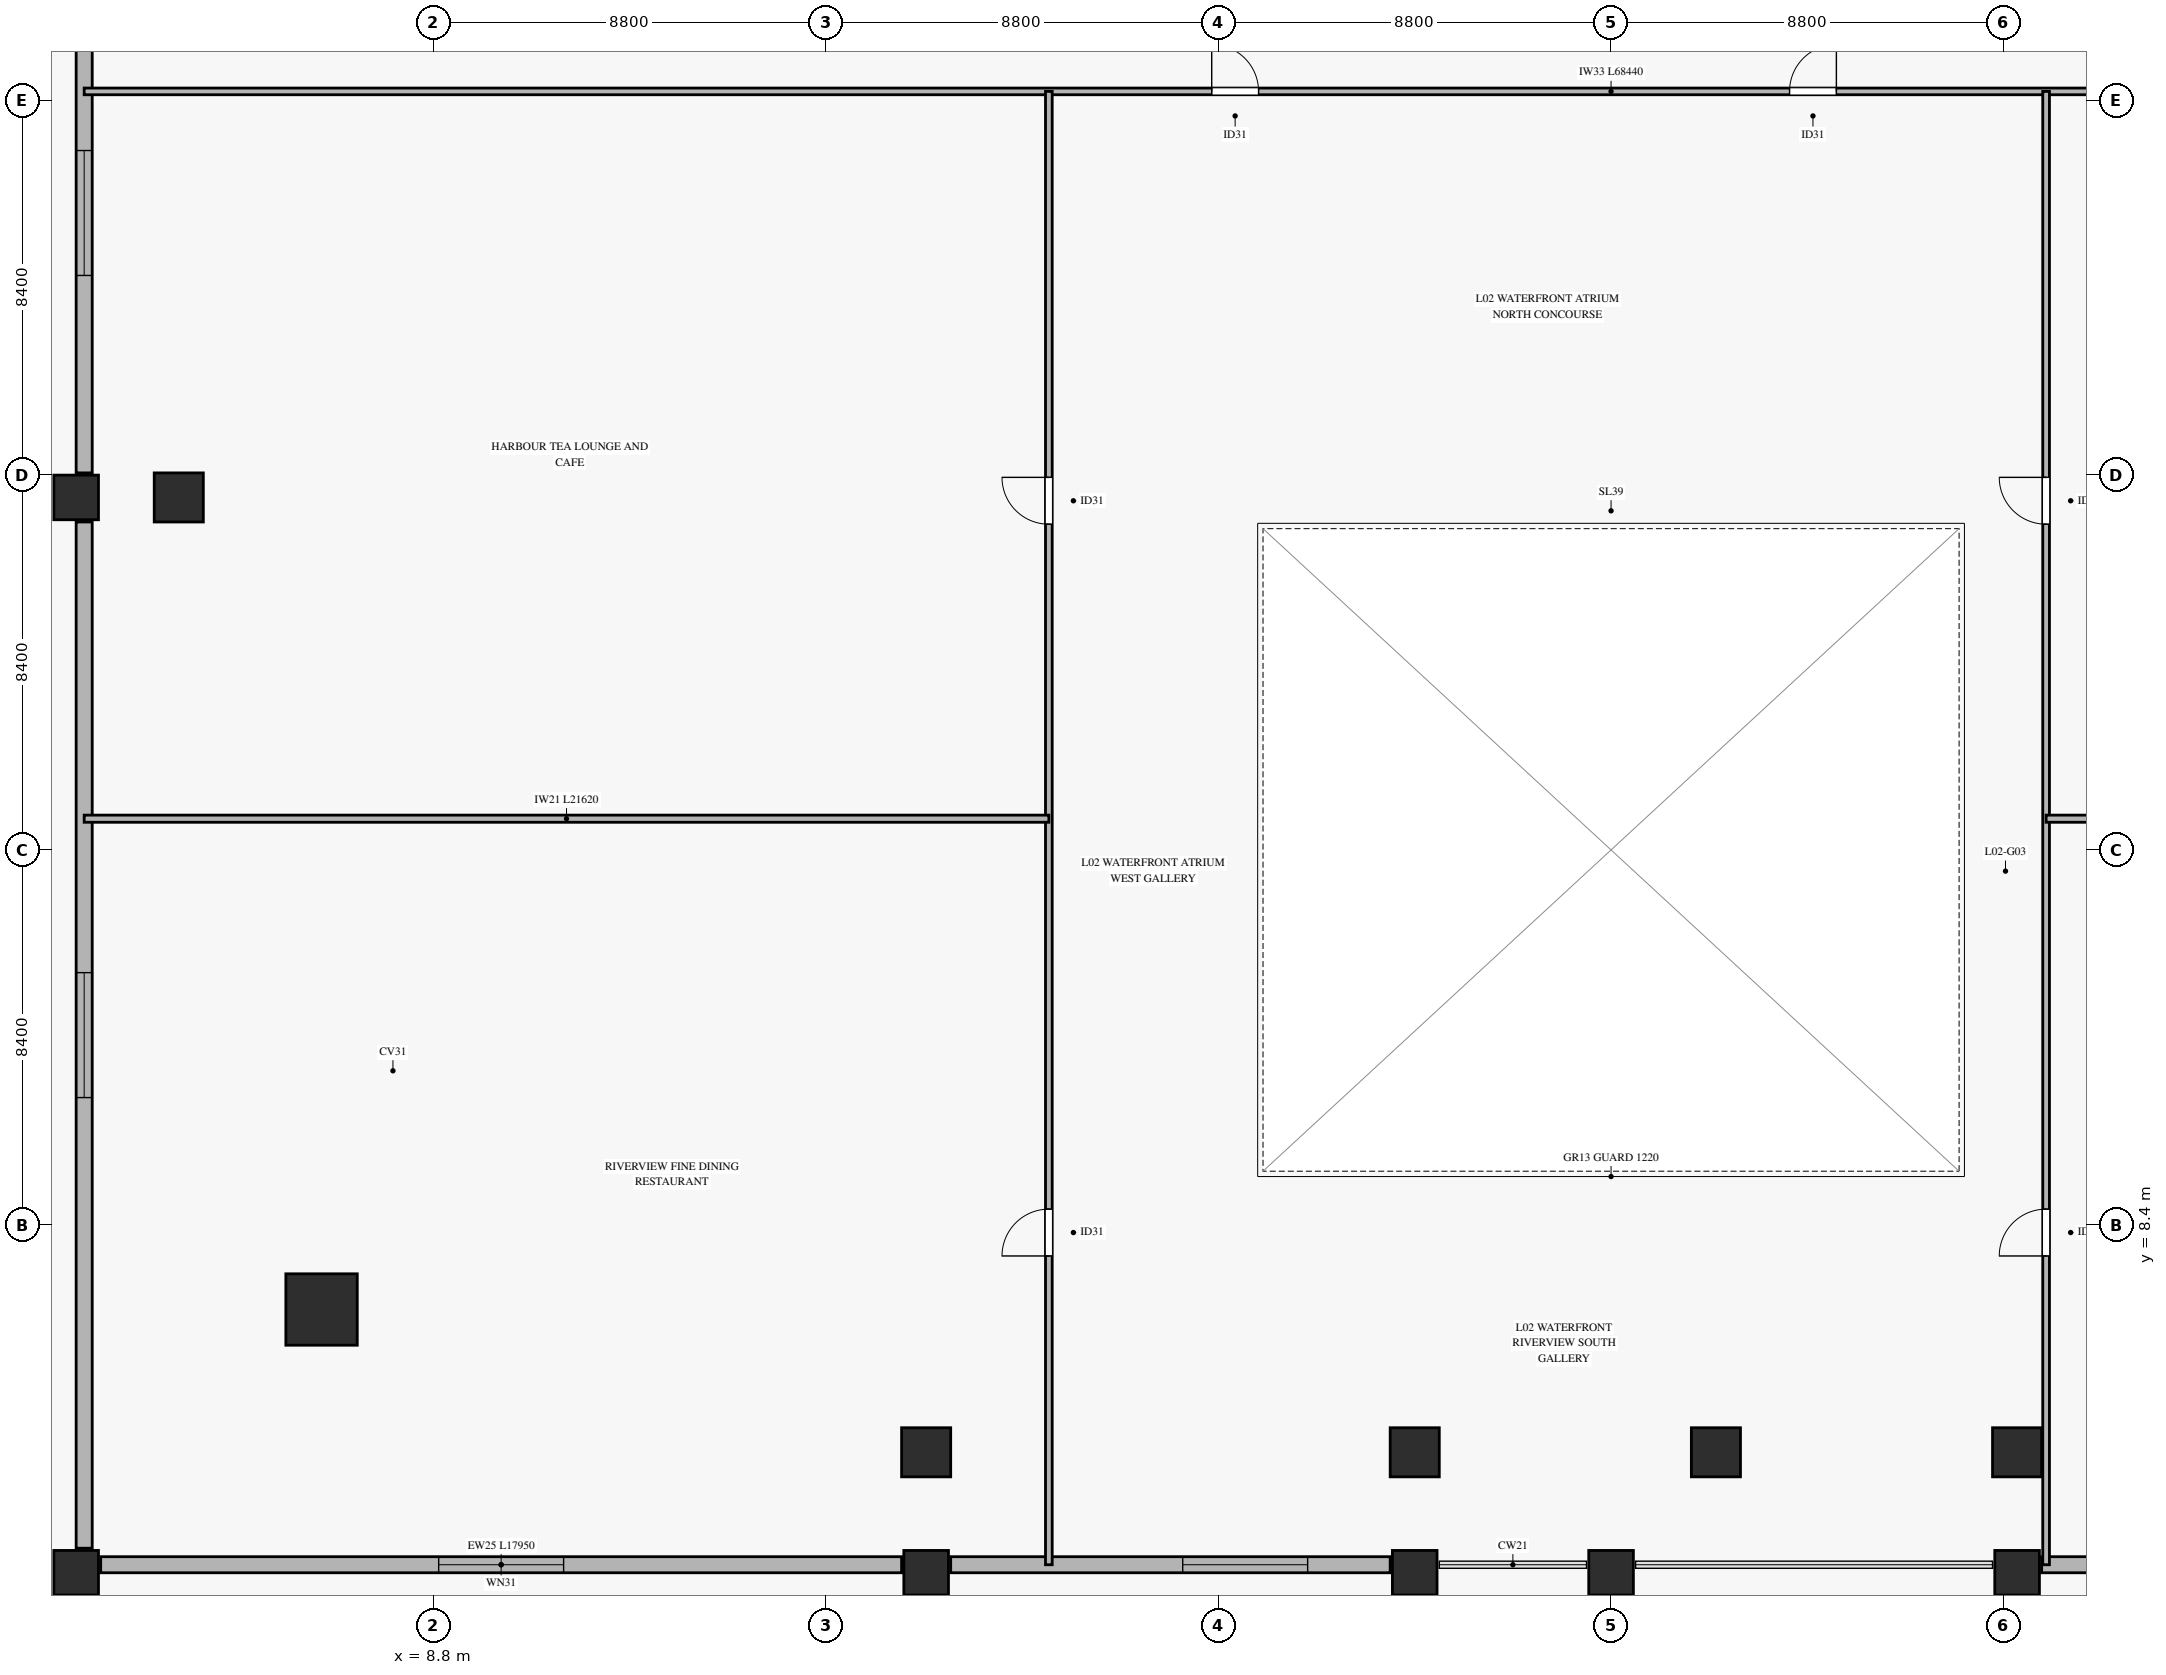
"""IFC4 building model, lengths in metres.
Left out: names, types, materials, properties, quantities, classifications, styles, units other than length and angle.
Written with IfcOpenShell. Run it as: python <this file> out.ifc"""

import sys

from ifc_helpers import new_model, si_unit, direction, frame, frame_2d, origin, origin_2d, place, context, subcontext, project, spatial, rectangle, hollow_rectangle, extrude, source, transform, mapped, element, fill, save


model = new_model("IFC4")
c1 = context("Model", 3, precision=1e-05, world=origin(), true_north=direction((0.0, 1.0)))
c2 = subcontext(c1, "Body", "Model", "MODEL_VIEW")
j1 = project(units=[si_unit("LENGTHUNIT", "METRE"), si_unit("PLANEANGLEUNIT", "RADIAN")], contexts=[c1])
p1 = place(None, origin())
s1 = spatial("IfcSite", under=j1, at=p1, CompositionType="ELEMENT")
p2 = place(p1, origin())
s2 = spatial("IfcBuilding", under=s1, at=p2, CompositionType="ELEMENT")
p3 = place(p2, frame((0.0, 0.0, 5.6)))
s3 = spatial("IfcBuildingStorey", under=s2, at=p3, CompositionType="ELEMENT", Elevation=5.6)
m1 = source(origin(), c2, "Body", "SweptSolid", [
    extrude(hollow_rectangle(XDim=1.6, YDim=1.6, WallThickness=0.075, at=origin_2d()), origin(), (0.0, 0.0, 1.0), 4.54),
])
p4 = place(p3, frame((6.3, 6.5, 0.0), z_axis=(0.0, 0.0, 1.0), x_axis=(1.0, 0.0, 0.0)))
e1 = element("IfcColumn", 1, at=p4, inside=s3, PredefinedType="COLUMN", context=c2, shape_type="MappedRepresentation", body=[
    mapped(m1, transform((0.0, 0.0, 0.0), x_axis=(1.0, 0.0, 0.0), y_axis=(0.0, 1.0, 0.0), z_axis=(0.0, 0.0, 1.0), scale=1.0)),
])
m2 = source(origin(), c2, "Body", "SweptSolid", [
    extrude(hollow_rectangle(XDim=1.1, YDim=1.1, WallThickness=0.05, at=origin_2d()), origin(), (0.0, 0.0, 1.0), 4.54),
])
for number, where, z_axis, x_axis in (
    (2, (19.85, 3.3, 0.0), (0.0, 0.0, 1.0), (1.0, 0.0, 0.0)),
    (3, (30.8, 3.3, 0.0), (0.0, 0.0, 1.0), (1.0, 0.0, 0.0)),
    (4, (37.55, 3.3, 0.0), (0.0, 0.0, 1.0), (1.0, 0.0, 0.0)),
    (5, (44.3, 3.3, 0.0), (0.0, 0.0, 1.0), (1.0, 0.0, 0.0)),
    (6, (3.1, 24.7, 0.0), (0.0, 0.0, 1.0), (1.0, 0.0, 0.0)),
):
    element("IfcColumn", number, at=place(p3, frame(where, z_axis=z_axis, x_axis=x_axis)), inside=s3, PredefinedType="COLUMN", context=c2, shape_type="MappedRepresentation", body=[
        mapped(m2, transform((0.0, 0.0, 0.0), x_axis=(1.0, 0.0, 0.0), y_axis=(0.0, 1.0, 0.0), z_axis=(0.0, 0.0, 1.0), scale=1.0)),
    ])
m3 = source(origin(), c2, "Body", "SweptSolid", [
    extrude(hollow_rectangle(XDim=1.0, YDim=1.0, WallThickness=0.045, at=origin_2d()), origin(), (0.0, 0.0, 1.0), 4.54),
])
for number, where, z_axis, x_axis in (
    (7, (0.8, 0.6, 0.0), (0.0, 0.0, 1.0), (1.0, 0.0, 0.0)),
    (8, (19.85, 0.6, 0.0), (0.0, 0.0, 1.0), (1.0, 0.0, 0.0)),
    (9, (30.8, 0.6, 0.0), (0.0, 0.0, 1.0), (1.0, 0.0, 0.0)),
    (10, (35.2, 0.6, 0.0), (0.0, 0.0, 1.0), (1.0, 0.0, 0.0)),
    (11, (44.3, 0.6, 0.0), (0.0, 0.0, 1.0), (1.0, 0.0, 0.0)),
    (12, (0.8, 24.7, 0.0), (0.0, 0.0, 1.0), (1.0, 0.0, 0.0)),
):
    element("IfcColumn", number, at=place(p3, frame(where, z_axis=z_axis, x_axis=x_axis)), inside=s3, PredefinedType="COLUMN", context=c2, shape_type="MappedRepresentation", body=[
        mapped(m3, transform((0.0, 0.0, 0.0), x_axis=(1.0, 0.0, 0.0), y_axis=(0.0, 1.0, 0.0), z_axis=(0.0, 0.0, 1.0), scale=1.0)),
    ])
p5 = place(p3, frame((1.35, 0.78, 0.0), z_axis=(0.0, 0.0, 1.0), x_axis=(1.0, 0.0, 0.0)))
e13 = element("IfcWall", 13, at=p5, inside=s3, PredefinedType="SOLIDWALL", context=c2, shape_type="SweptSolid", body=[
    extrude(rectangle(XDim=17.95, YDim=0.36, at=frame_2d((8.975, 0.0))), origin(), (0.0, 0.0, 1.0), 3.42),
])
p6 = place(p5, frame((7.575, 0.0, 0.72)))
e14 = element("IfcOpeningElement", 14, at=p6, cuts=e13, PredefinedType="OPENING", context=c2, shape_type="SweptSolid", body=[
    extrude(rectangle(XDim=2.8, YDim=2.0, at=frame_2d((1.4, 1.0))), frame((0.0, 0.19, 0.0), z_axis=(0.0, -1.0, 0.0), x_axis=(1.0, 0.0, 0.0)), (0.0, 0.0, 1.0), 0.38),
])
p7 = place(p3, frame((20.4, 0.78, 0.0), z_axis=(0.0, 0.0, 1.0), x_axis=(1.0, 0.0, 0.0)))
e15 = element("IfcWall", 15, at=p7, inside=s3, PredefinedType="SOLIDWALL", context=c2, shape_type="SweptSolid", body=[
    extrude(rectangle(XDim=9.85, YDim=0.36, at=frame_2d((4.925, 0.0))), origin(), (0.0, 0.0, 1.0), 3.42),
])
p8 = place(p7, frame((5.2, 0.0, 0.72)))
e16 = element("IfcOpeningElement", 16, at=p8, cuts=e15, PredefinedType="OPENING", context=c2, shape_type="SweptSolid", body=[
    extrude(rectangle(XDim=2.8, YDim=2.0, at=frame_2d((1.4, 1.0))), frame((0.0, 0.19, 0.0), z_axis=(0.0, -1.0, 0.0), x_axis=(1.0, 0.0, 0.0)), (0.0, 0.0, 1.0), 0.38),
])
p9 = place(p3, frame((44.85, 0.78, 0.0), z_axis=(0.0, 0.0, 1.0), x_axis=(1.0, 0.0, 0.0)))
e17 = element("IfcWall", 17, at=p9, inside=s3, PredefinedType="SOLIDWALL", context=c2, shape_type="SweptSolid", body=[
    extrude(rectangle(XDim=5.15, YDim=0.36, at=frame_2d((2.575, 0.0))), origin(), (0.0, 0.0, 1.0), 3.42),
])
p10 = place(p9, frame((1.5, 0.0, 0.72)))
e18 = element("IfcOpeningElement", 18, at=p10, cuts=e17, PredefinedType="OPENING", context=c2, shape_type="SweptSolid", body=[
    extrude(rectangle(XDim=2.8, YDim=2.0, at=frame_2d((1.4, 1.0))), frame((0.0, 0.19, 0.0), z_axis=(0.0, -1.0, 0.0), x_axis=(1.0, 0.0, 0.0)), (0.0, 0.0, 1.0), 0.38),
])
p11 = place(p3, frame((0.98, 1.15, 0.0), z_axis=(0.0, 0.0, 1.0), x_axis=(0.0, 1.0, 0.0)))
e19 = element("IfcWall", 19, at=p11, inside=s3, PredefinedType="SOLIDWALL", context=c2, shape_type="SweptSolid", body=[
    extrude(rectangle(XDim=23.0, YDim=0.36, at=frame_2d((11.5, 0.0))), origin(), (0.0, 0.0, 1.0), 3.42),
])
p12 = place(p11, frame((10.1, 0.0, 0.72)))
e20 = element("IfcOpeningElement", 20, at=p12, cuts=e19, PredefinedType="OPENING", context=c2, shape_type="SweptSolid", body=[
    extrude(rectangle(XDim=2.8, YDim=2.0, at=frame_2d((1.4, 1.0))), frame((0.0, 0.19, 0.0), z_axis=(0.0, -1.0, 0.0), x_axis=(1.0, 0.0, 0.0)), (0.0, 0.0, 1.0), 0.38),
])
p13 = place(p3, frame((0.98, 25.25, 0.0), z_axis=(0.0, 0.0, 1.0), x_axis=(0.0, 1.0, 0.0)))
e21 = element("IfcWall", 21, at=p13, inside=s3, PredefinedType="SOLIDWALL", context=c2, shape_type="SweptSolid", body=[
    extrude(rectangle(XDim=11.65, YDim=0.36, at=frame_2d((5.825, 0.0))), origin(), (0.0, 0.0, 1.0), 3.42),
])
p14 = place(p13, frame((4.425, 0.0, 0.72)))
e22 = element("IfcOpeningElement", 22, at=p14, cuts=e21, PredefinedType="OPENING", context=c2, shape_type="SweptSolid", body=[
    extrude(rectangle(XDim=2.8, YDim=2.0, at=frame_2d((1.4, 1.0))), frame((0.0, 0.19, 0.0), z_axis=(0.0, -1.0, 0.0), x_axis=(1.0, 0.0, 0.0)), (0.0, 0.0, 1.0), 0.38),
])
p15 = place(p3, frame((0.98, 33.8, 0.0), z_axis=(0.0, 0.0, 1.0), x_axis=(1.0, 0.0, 0.0)))
e23 = element("IfcWall", 23, at=p15, inside=s3, PredefinedType="PARTITIONING", context=c2, shape_type="SweptSolid", body=[
    extrude(rectangle(XDim=68.44, YDim=0.15, at=frame_2d((34.22, 0.0))), origin(), (0.0, 0.0, 1.0), 3.425),
])
p16 = place(p15, frame((25.27, 0.0, 0.0)))
e24 = element("IfcOpeningElement", 24, at=p16, cuts=e23, PredefinedType="OPENING", context=c2, shape_type="SweptSolid", body=[
    extrude(rectangle(XDim=1.05, YDim=2.15, at=frame_2d((0.525, 1.075))), frame((0.0, 0.085, 0.0), z_axis=(0.0, -1.0, 0.0), x_axis=(1.0, 0.0, 0.0)), (0.0, 0.0, 1.0), 0.17),
])
p17 = place(p15, frame((38.22, 0.0, 0.0)))
e25 = element("IfcOpeningElement", 25, at=p17, cuts=e23, PredefinedType="OPENING", context=c2, shape_type="SweptSolid", body=[
    extrude(rectangle(XDim=1.05, YDim=2.15, at=frame_2d((0.525, 1.075))), frame((0.0, 0.085, 0.0), z_axis=(0.0, -1.0, 0.0), x_axis=(1.0, 0.0, 0.0)), (0.0, 0.0, 1.0), 0.17),
])
p18 = place(p3, frame((22.6, 0.78, 0.0), z_axis=(0.0, 0.0, 1.0), x_axis=(0.0, 1.0, 0.0)))
e26 = element("IfcWall", 26, at=p18, inside=s3, PredefinedType="PARTITIONING", context=c2, shape_type="SweptSolid", body=[
    extrude(rectangle(XDim=33.02, YDim=0.15, at=frame_2d((16.51, 0.0))), origin(), (0.0, 0.0, 1.0), 3.425),
])
p19 = place(p18, frame((6.92, 0.0, 0.0)))
e27 = element("IfcOpeningElement", 27, at=p19, cuts=e26, PredefinedType="OPENING", context=c2, shape_type="SweptSolid", body=[
    extrude(rectangle(XDim=1.05, YDim=2.15, at=frame_2d((0.525, 1.075))), frame((0.0, 0.085, 0.0), z_axis=(0.0, -1.0, 0.0), x_axis=(1.0, 0.0, 0.0)), (0.0, 0.0, 1.0), 0.17),
])
p20 = place(p18, frame((23.32, 0.0, 0.0)))
e28 = element("IfcOpeningElement", 28, at=p20, cuts=e26, PredefinedType="OPENING", context=c2, shape_type="SweptSolid", body=[
    extrude(rectangle(XDim=1.05, YDim=2.15, at=frame_2d((0.525, 1.075))), frame((0.0, 0.085, 0.0), z_axis=(0.0, -1.0, 0.0), x_axis=(1.0, 0.0, 0.0)), (0.0, 0.0, 1.0), 0.17),
])
p21 = place(p3, frame((44.95, 0.78, 0.0), z_axis=(0.0, 0.0, 1.0), x_axis=(0.0, 1.0, 0.0)))
e29 = element("IfcWall", 29, at=p21, inside=s3, PredefinedType="PARTITIONING", context=c2, shape_type="SweptSolid", body=[
    extrude(rectangle(XDim=33.02, YDim=0.15, at=frame_2d((16.51, 0.0))), origin(), (0.0, 0.0, 1.0), 3.425),
])
p22 = place(p21, frame((6.92, 0.0, 0.0)))
e30 = element("IfcOpeningElement", 30, at=p22, cuts=e29, PredefinedType="OPENING", context=c2, shape_type="SweptSolid", body=[
    extrude(rectangle(XDim=1.05, YDim=2.15, at=frame_2d((0.525, 1.075))), frame((0.0, 0.085, 0.0), z_axis=(0.0, -1.0, 0.0), x_axis=(1.0, 0.0, 0.0)), (0.0, 0.0, 1.0), 0.17),
])
p23 = place(p21, frame((23.32, 0.0, 0.0)))
e31 = element("IfcOpeningElement", 31, at=p23, cuts=e29, PredefinedType="OPENING", context=c2, shape_type="SweptSolid", body=[
    extrude(rectangle(XDim=1.05, YDim=2.15, at=frame_2d((0.525, 1.075))), frame((0.0, 0.085, 0.0), z_axis=(0.0, -1.0, 0.0), x_axis=(1.0, 0.0, 0.0)), (0.0, 0.0, 1.0), 0.17),
])
p24 = place(p3, frame((0.98, 17.5, 0.0), z_axis=(0.0, 0.0, 1.0), x_axis=(1.0, 0.0, 0.0)))
e32 = element("IfcWall", 32, at=p24, inside=s3, PredefinedType="PARTITIONING", context=c2, shape_type="SweptSolid", body=[
    extrude(rectangle(XDim=21.62, YDim=0.16, at=frame_2d((10.81, 0.0))), origin(), (0.0, 0.0, 1.0), 3.425),
])
p25 = place(p3, frame((44.95, 17.5, 0.0), z_axis=(0.0, 0.0, 1.0), x_axis=(1.0, 0.0, 0.0)))
e33 = element("IfcWall", 33, at=p25, inside=s3, PredefinedType="PARTITIONING", context=c2, shape_type="SweptSolid", body=[
    extrude(rectangle(XDim=24.47, YDim=0.16, at=frame_2d((12.235, 0.0))), origin(), (0.0, 0.0, 1.0), 3.425),
])
m4 = source(origin(), c2, "Body", "SweptSolid", [
    extrude(rectangle(XDim=2.8, YDim=2.0, at=frame_2d((1.4, 1.0))), frame((0.0, 0.03, 0.0), z_axis=(0.0, -1.0, 0.0), x_axis=(1.0, 0.0, 0.0)), (0.0, 0.0, 1.0), 0.06),
])
p26 = place(p6, origin())
e34 = element("IfcWindow", 34, at=p26, inside=s3, PartitioningType="SINGLE_PANEL", PredefinedType="WINDOW", context=c2, shape_type="MappedRepresentation", body=[
    mapped(m4, transform((0.0, 0.0, 0.0), x_axis=(1.0, 0.0, 0.0), y_axis=(0.0, 1.0, 0.0), z_axis=(0.0, 0.0, 1.0), scale=1.0)),
])
fill(e14, e34)
p27 = place(p8, origin())
e35 = element("IfcWindow", 35, at=p27, inside=s3, PartitioningType="SINGLE_PANEL", PredefinedType="WINDOW", context=c2, shape_type="MappedRepresentation", body=[
    mapped(m4, transform((0.0, 0.0, 0.0), x_axis=(1.0, 0.0, 0.0), y_axis=(0.0, 1.0, 0.0), z_axis=(0.0, 0.0, 1.0), scale=1.0)),
])
fill(e16, e35)
p28 = place(p12, origin())
e36 = element("IfcWindow", 36, at=p28, inside=s3, PartitioningType="SINGLE_PANEL", PredefinedType="WINDOW", context=c2, shape_type="MappedRepresentation", body=[
    mapped(m4, transform((0.0, 0.0, 0.0), x_axis=(1.0, 0.0, 0.0), y_axis=(0.0, 1.0, 0.0), z_axis=(0.0, 0.0, 1.0), scale=1.0)),
])
fill(e20, e36)
p29 = place(p14, origin())
e37 = element("IfcWindow", 37, at=p29, inside=s3, PartitioningType="SINGLE_PANEL", PredefinedType="WINDOW", context=c2, shape_type="MappedRepresentation", body=[
    mapped(m4, transform((0.0, 0.0, 0.0), x_axis=(1.0, 0.0, 0.0), y_axis=(0.0, 1.0, 0.0), z_axis=(0.0, 0.0, 1.0), scale=1.0)),
])
fill(e22, e37)
m5 = source(origin(), c2, "Body", "SweptSolid", [
    extrude(rectangle(XDim=1.05, YDim=2.15, at=frame_2d((0.525, 1.075))), frame((0.0, 0.025, 0.0), z_axis=(0.0, -1.0, 0.0), x_axis=(1.0, 0.0, 0.0)), (0.0, 0.0, 1.0), 0.05),
])
p30 = place(p16, origin())
e38 = element("IfcDoor", 38, at=p30, inside=s3, OperationType="SINGLE_SWING_LEFT", PredefinedType="DOOR", context=c2, shape_type="MappedRepresentation", body=[
    mapped(m5, transform((0.0, 0.0, 0.0), x_axis=(1.0, 0.0, 0.0), y_axis=(0.0, 1.0, 0.0), z_axis=(0.0, 0.0, 1.0), scale=1.0)),
])
fill(e24, e38)
p31 = place(p17, origin())
e39 = element("IfcDoor", 39, at=p31, inside=s3, OperationType="SINGLE_SWING_RIGHT", PredefinedType="DOOR", context=c2, shape_type="MappedRepresentation", body=[
    mapped(m5, transform((0.0, 0.0, 0.0), x_axis=(1.0, 0.0, 0.0), y_axis=(0.0, 1.0, 0.0), z_axis=(0.0, 0.0, 1.0), scale=1.0)),
])
fill(e25, e39)
p32 = place(p19, origin())
e40 = element("IfcDoor", 40, at=p32, inside=s3, OperationType="SINGLE_SWING_LEFT", PredefinedType="DOOR", context=c2, shape_type="MappedRepresentation", body=[
    mapped(m5, transform((0.0, 0.0, 0.0), x_axis=(1.0, 0.0, 0.0), y_axis=(0.0, 1.0, 0.0), z_axis=(0.0, 0.0, 1.0), scale=1.0)),
])
fill(e27, e40)
p33 = place(p20, origin())
e41 = element("IfcDoor", 41, at=p33, inside=s3, OperationType="SINGLE_SWING_RIGHT", PredefinedType="DOOR", context=c2, shape_type="MappedRepresentation", body=[
    mapped(m5, transform((0.0, 0.0, 0.0), x_axis=(1.0, 0.0, 0.0), y_axis=(0.0, 1.0, 0.0), z_axis=(0.0, 0.0, 1.0), scale=1.0)),
])
fill(e28, e41)
p34 = place(p22, origin())
e42 = element("IfcDoor", 42, at=p34, inside=s3, OperationType="SINGLE_SWING_LEFT", PredefinedType="DOOR", context=c2, shape_type="MappedRepresentation", body=[
    mapped(m5, transform((0.0, 0.0, 0.0), x_axis=(1.0, 0.0, 0.0), y_axis=(0.0, 1.0, 0.0), z_axis=(0.0, 0.0, 1.0), scale=1.0)),
])
fill(e30, e42)
p35 = place(p23, origin())
e43 = element("IfcDoor", 43, at=p35, inside=s3, OperationType="SINGLE_SWING_RIGHT", PredefinedType="DOOR", context=c2, shape_type="MappedRepresentation", body=[
    mapped(m5, transform((0.0, 0.0, 0.0), x_axis=(1.0, 0.0, 0.0), y_axis=(0.0, 1.0, 0.0), z_axis=(0.0, 0.0, 1.0), scale=1.0)),
])
fill(e31, e43)
save(model, sys.argv[1])
